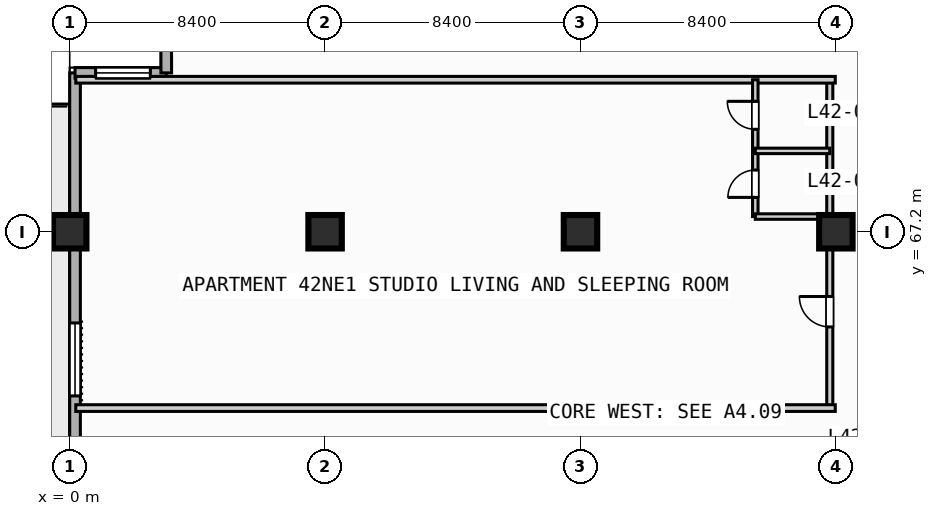
"""IFC4 building model, lengths in metres.
Left out: names, types, materials, properties, quantities, classifications, styles, units other than length and angle.
Written with IfcOpenShell. Run it as: python <this file> out.ifc"""

import sys

from ifc_helpers import new_model, si_unit, direction, frame, frame_2d, origin, origin_2d, place, context, subcontext, project, spatial, rectangle, extrude, element, fill, save


model = new_model("IFC4")
c1 = context("Model", 3, precision=1e-05, world=origin(), true_north=direction((0.0, 1.0)))
c2 = subcontext(c1, "Body", "Model", "MODEL_VIEW")
j1 = project(units=[si_unit("LENGTHUNIT", "METRE"), si_unit("PLANEANGLEUNIT", "RADIAN")], contexts=[c1])
p1 = place(None, origin())
s1 = spatial("IfcSite", under=j1, at=p1, CompositionType="ELEMENT")
p2 = place(p1, origin())
s2 = spatial("IfcBuilding", under=s1, at=p2, CompositionType="ELEMENT")
p3 = place(p2, frame((0.0, 0.0, 175.4)))
s3 = spatial("IfcBuildingStorey", under=s2, at=p3, CompositionType="ELEMENT", Elevation=175.4)
for number, where, z_axis, x_axis in (
    (1, (0.0, 67.2, 0.0), (0.0, 0.0, 1.0), (1.0, 0.0, 0.0)),
    (2, (8.4, 67.2, 0.0), (0.0, 0.0, 1.0), (1.0, 0.0, 0.0)),
    (3, (16.8, 67.2, 0.0), (0.0, 0.0, 1.0), (1.0, 0.0, 0.0)),
    (4, (25.2, 67.2, 0.0), (0.0, 0.0, 1.0), (1.0, 0.0, 0.0)),
):
    element("IfcColumn", number, at=place(p3, frame(where, z_axis=z_axis, x_axis=x_axis)), inside=s3, PredefinedType="COLUMN", context=c2, shape_type="SweptSolid", body=[
        extrude(rectangle(XDim=1.1, YDim=1.1, at=origin_2d()), origin(), (0.0, 0.0, 1.0), 3.7),
    ])
p4 = place(p3, frame((0.175, 3.175, 0.0), z_axis=(0.0, 0.0, 1.0), x_axis=(0.0, 1.0, 0.0)))
e5 = element("IfcWall", 5, at=p4, inside=s3, PredefinedType="STANDARD", context=c2, shape_type="SweptSolid", body=[
    extrude(rectangle(XDim=69.25, YDim=0.35, at=frame_2d((34.625, 0.0))), origin(), (0.0, 0.0, 1.0), 3.47),
])
p5 = place(p4, frame((42.325, 0.0, 0.0)))
e6 = element("IfcOpeningElement", 6, at=p5, cuts=e5, PredefinedType="OPENING", context=c2, shape_type="SweptSolid", body=[
    extrude(rectangle(XDim=1.4, YDim=2.2, at=frame_2d((0.7, 1.1))), frame((0.0, 0.185, 0.0), z_axis=(0.0, -1.0, 0.0), x_axis=(1.0, 0.0, 0.0)), (0.0, 0.0, 1.0), 0.37),
])
p6 = place(p4, frame((25.025, 0.0, 0.85)))
e7 = element("IfcOpeningElement", 7, at=p6, cuts=e5, PredefinedType="OPENING", context=c2, shape_type="SweptSolid", body=[
    extrude(rectangle(XDim=2.4, YDim=1.95, at=frame_2d((1.2, 0.975))), frame((0.0, 0.185, 0.0), z_axis=(0.0, -1.0, 0.0), x_axis=(1.0, 0.0, 0.0)), (0.0, 0.0, 1.0), 0.37),
])
p7 = place(p4, frame((33.725, 0.0, 0.85)))
e8 = element("IfcOpeningElement", 8, at=p7, cuts=e5, PredefinedType="OPENING", context=c2, shape_type="SweptSolid", body=[
    extrude(rectangle(XDim=1.8, YDim=1.8, at=frame_2d((0.9, 0.9))), frame((0.0, 0.185, 0.0), z_axis=(0.0, -1.0, 0.0), x_axis=(1.0, 0.0, 0.0)), (0.0, 0.0, 1.0), 0.37),
])
p8 = place(p4, frame((58.625, 0.0, 0.85)))
e9 = element("IfcOpeningElement", 9, at=p8, cuts=e5, PredefinedType="OPENING", context=c2, shape_type="SweptSolid", body=[
    extrude(rectangle(XDim=2.4, YDim=1.95, at=frame_2d((1.2, 0.975))), frame((0.0, 0.185, 0.0), z_axis=(0.0, -1.0, 0.0), x_axis=(1.0, 0.0, 0.0)), (0.0, 0.0, 1.0), 0.37),
])
p9 = place(p3, frame((0.175, 72.425, 0.0), z_axis=(0.0, 0.0, 1.0), x_axis=(1.0, 0.0, 0.0)))
e10 = element("IfcWall", 10, at=p9, inside=s3, PredefinedType="STANDARD", context=c2, shape_type="SweptSolid", body=[
    extrude(rectangle(XDim=3.0, YDim=0.35, at=frame_2d((1.5, 0.0))), origin(), (0.0, 0.0, 1.0), 3.47),
])
p10 = place(p9, frame((0.677, 0.0, 0.85)))
e11 = element("IfcOpeningElement", 11, at=p10, cuts=e10, PredefinedType="OPENING", context=c2, shape_type="SweptSolid", body=[
    extrude(rectangle(XDim=1.8, YDim=1.8, at=frame_2d((0.9, 0.9))), frame((0.0, 0.185, 0.0), z_axis=(0.0, -1.0, 0.0), x_axis=(1.0, 0.0, 0.0)), (0.0, 0.0, 1.0), 0.37),
])
p11 = place(p3, frame((3.175, 72.425, 0.0), z_axis=(0.0, 0.0, 1.0), x_axis=(0.0, 1.0, 0.0)))
e12 = element("IfcWall", 12, at=p11, inside=s3, PredefinedType="STANDARD", context=c2, shape_type="SweptSolid", body=[
    extrude(rectangle(XDim=3.0, YDim=0.35, at=frame_2d((1.5, 0.0))), origin(), (0.0, 0.0, 1.0), 3.47),
])
p12 = place(p3, frame((25.0, 61.4, 0.0), z_axis=(0.0, 0.0, 1.0), x_axis=(0.0, 1.0, 0.0)))
e13 = element("IfcWall", 13, at=p12, inside=s3, PredefinedType="PARTITIONING", context=c2, shape_type="SweptSolid", body=[
    extrude(rectangle(XDim=10.8, YDim=0.2, at=frame_2d((5.4, 0.0))), origin(), (0.0, 0.0, 1.0), 2.82),
])
p13 = place(p12, frame((2.67, 0.0, 0.0)))
e14 = element("IfcOpeningElement", 14, at=p13, cuts=e13, PredefinedType="OPENING", context=c2, shape_type="SweptSolid", body=[
    extrude(rectangle(XDim=1.0, YDim=2.15, at=frame_2d((0.5, 1.075))), frame((0.0, 0.11, 0.0), z_axis=(0.0, -1.0, 0.0), x_axis=(1.0, 0.0, 0.0)), (0.0, 0.0, 1.0), 0.22),
])
for number, where, z_axis, x_axis in (
    (15, (0.2, 61.4, 0.0), (0.0, 0.0, 1.0), (1.0, 0.0, 0.0)),
    (16, (0.2, 72.2, 0.0), (0.0, 0.0, 1.0), (1.0, 0.0, 0.0)),
):
    element("IfcWall", number, at=place(p3, frame(where, z_axis=z_axis, x_axis=x_axis)), inside=s3, PredefinedType="PARTITIONING", context=c2, shape_type="SweptSolid", body=[
        extrude(rectangle(XDim=24.98, YDim=0.22, at=frame_2d((12.49, 0.0))), origin(), (0.0, 0.0, 1.0), 3.47),
    ])
p14 = place(p3, frame((22.55, 67.7, 0.0), z_axis=(0.0, 0.0, 1.0), x_axis=(0.0, 1.0, 0.0)))
e17 = element("IfcWall", 17, at=p14, inside=s3, PredefinedType="PLUMBINGWALL", context=c2, shape_type="SweptSolid", body=[
    extrude(rectangle(XDim=4.5, YDim=0.18, at=frame_2d((2.25, 0.0))), origin(), (0.0, 0.0, 1.0), 3.47),
])
p15 = place(p14, frame((0.63, 0.0, 0.0)))
e18 = element("IfcOpeningElement", 18, at=p15, cuts=e17, PredefinedType="OPENING", context=c2, shape_type="SweptSolid", body=[
    extrude(rectangle(XDim=0.9, YDim=2.1, at=frame_2d((0.45, 1.05))), frame((0.0, 0.1, 0.0), z_axis=(0.0, -1.0, 0.0), x_axis=(1.0, 0.0, 0.0)), (0.0, 0.0, 1.0), 0.2),
])
p16 = place(p14, frame((2.87, 0.0, 0.0)))
e19 = element("IfcOpeningElement", 19, at=p16, cuts=e17, PredefinedType="OPENING", context=c2, shape_type="SweptSolid", body=[
    extrude(rectangle(XDim=0.92, YDim=2.1, at=frame_2d((0.46, 1.05))), frame((0.0, 0.1, 0.0), z_axis=(0.0, -1.0, 0.0), x_axis=(1.0, 0.0, 0.0)), (0.0, 0.0, 1.0), 0.2),
])
for number, where, z_axis, x_axis in (
    (20, (22.55, 67.7, 0.0), (0.0, 0.0, 1.0), (1.0, 0.0, 0.0)),
    (21, (22.55, 69.86, 0.0), (0.0, 0.0, 1.0), (1.0, 0.0, 0.0)),
):
    element("IfcWall", number, at=place(p3, frame(where, z_axis=z_axis, x_axis=x_axis)), inside=s3, PredefinedType="PLUMBINGWALL", context=c2, shape_type="SweptSolid", body=[
        extrude(rectangle(XDim=2.45, YDim=0.18, at=frame_2d((1.225, 0.0))), origin(), (0.0, 0.0, 1.0), 3.47),
    ])
p17 = place(p8, origin())
e22 = element("IfcWindow", 22, at=p17, inside=s3, PartitioningType="SINGLE_PANEL", PredefinedType="WINDOW", context=c2, shape_type="SweptSolid", body=[
    extrude(rectangle(XDim=2.4, YDim=1.95, at=frame_2d((1.2, 0.975))), frame((0.0, 0.03, 0.0), z_axis=(0.0, -1.0, 0.0), x_axis=(1.0, 0.0, 0.0)), (0.0, 0.0, 1.0), 0.06),
])
fill(e9, e22)
p18 = place(p10, origin())
e23 = element("IfcWindow", 23, at=p18, inside=s3, PartitioningType="SINGLE_PANEL", PredefinedType="WINDOW", context=c2, shape_type="SweptSolid", body=[
    extrude(rectangle(XDim=1.8, YDim=1.8, at=frame_2d((0.9, 0.9))), frame((0.0, 0.03, 0.0), z_axis=(0.0, -1.0, 0.0), x_axis=(1.0, 0.0, 0.0)), (0.0, 0.0, 1.0), 0.06),
])
fill(e11, e23)
p19 = place(p13, origin())
e24 = element("IfcDoor", 24, at=p19, inside=s3, OperationType="SINGLE_SWING_RIGHT", PredefinedType="DOOR", context=c2, shape_type="SweptSolid", body=[
    extrude(rectangle(XDim=1.0, YDim=2.15, at=frame_2d((0.5, 1.075))), frame((0.0, 0.025, 0.0), z_axis=(0.0, -1.0, 0.0), x_axis=(1.0, 0.0, 0.0)), (0.0, 0.0, 1.0), 0.05),
])
fill(e14, e24)
p20 = place(p15, origin())
e25 = element("IfcDoor", 25, at=p20, inside=s3, OperationType="SINGLE_SWING_LEFT", PredefinedType="DOOR", context=c2, shape_type="SweptSolid", body=[
    extrude(rectangle(XDim=0.9, YDim=2.1, at=frame_2d((0.45, 1.05))), frame((0.0, 0.025, 0.0), z_axis=(0.0, -1.0, 0.0), x_axis=(1.0, 0.0, 0.0)), (0.0, 0.0, 1.0), 0.05),
])
fill(e18, e25)
p21 = place(p16, origin())
e26 = element("IfcDoor", 26, at=p21, inside=s3, OperationType="SINGLE_SWING_RIGHT", PredefinedType="DOOR", context=c2, shape_type="SweptSolid", body=[
    extrude(rectangle(XDim=0.92, YDim=2.1, at=frame_2d((0.46, 1.05))), frame((0.0, 0.025, 0.0), z_axis=(0.0, -1.0, 0.0), x_axis=(1.0, 0.0, 0.0)), (0.0, 0.0, 1.0), 0.05),
])
fill(e19, e26)
save(model, sys.argv[1])
